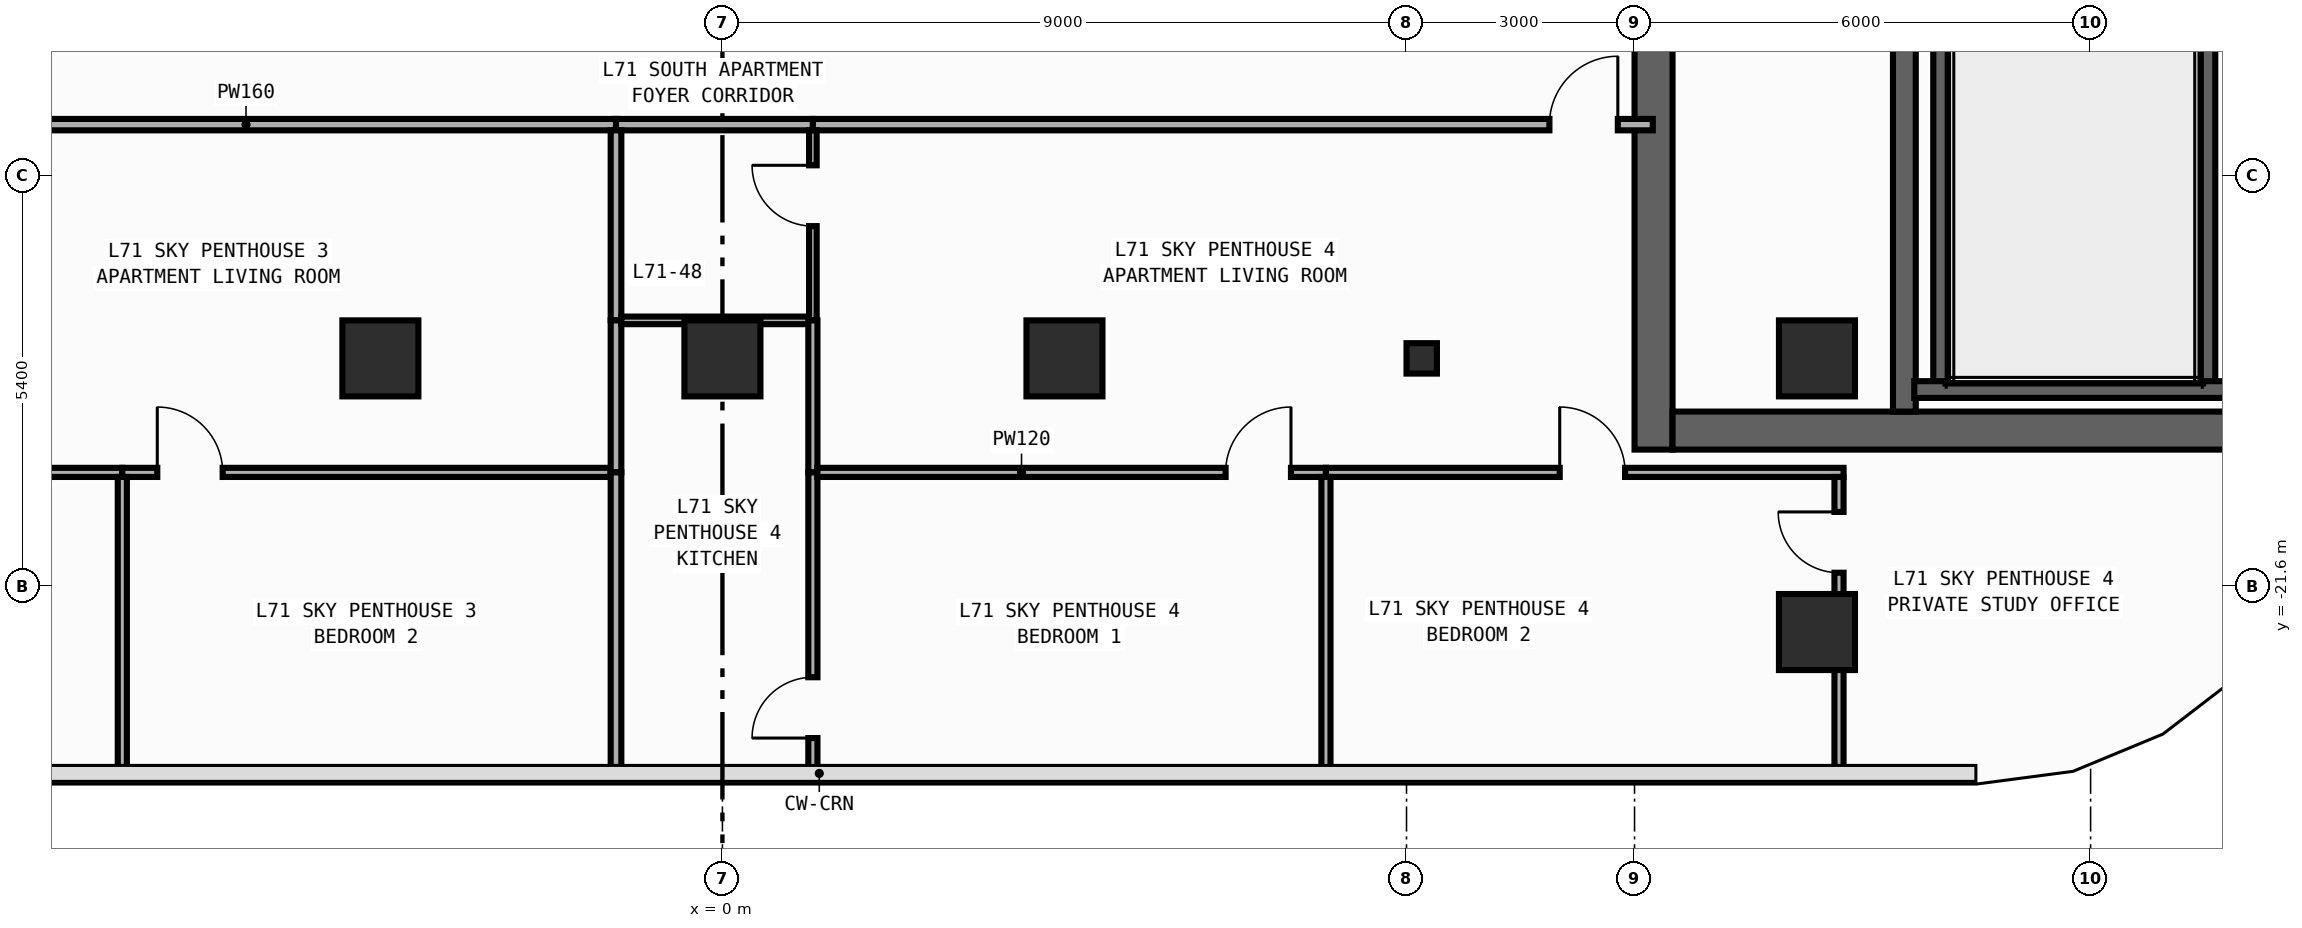
"""IFC4 building model, lengths in metres.
Left out: names, types, materials, properties, quantities, classifications, styles, units other than length and angle.
Written with IfcOpenShell. Run it as: python <this file> out.ifc"""

import sys

from ifc_helpers import new_model, si_unit, direction, frame, frame_2d, origin, origin_2d, place, context, subcontext, project, spatial, rectangle, circle, i_section, extrude, element, fill, save


model = new_model("IFC4")
c1 = context("Model", 3, precision=1e-05, world=origin(), true_north=direction((0.0, 1.0)))
c2 = subcontext(c1, "Body", "Model", "MODEL_VIEW")
j1 = project(units=[si_unit("LENGTHUNIT", "METRE"), si_unit("PLANEANGLEUNIT", "RADIAN")], contexts=[c1])
p1 = place(None, origin())
s1 = spatial("IfcSite", under=j1, at=p1, CompositionType="ELEMENT")
p2 = place(p1, origin())
s2 = spatial("IfcBuilding", under=s1, at=p2, CompositionType="ELEMENT")
p3 = place(p2, frame((0.0, 0.0, 296.6)))
s3 = spatial("IfcBuildingStorey", under=s2, at=p3, CompositionType="ELEMENT", Elevation=296.6)
p4 = place(p3, frame((12.25, -19.8, 0.0), z_axis=(0.0, 0.0, 1.0), x_axis=(0.0, 1.0, 0.0)))
e1 = element("IfcWall", 1, at=p4, inside=s3, PredefinedType="SHEAR", context=c2, shape_type="SweptSolid", body=[
    extrude(rectangle(XDim=27.0, YDim=0.5, at=frame_2d((13.5, 0.0))), origin(), (0.0, 0.0, 1.0), 3.54),
])
p5 = place(p4, frame((23.05, 0.0, 0.0)))
e2 = element("IfcOpeningElement", 2, at=p5, cuts=e1, PredefinedType="OPENING", context=c2, shape_type="SweptSolid", body=[
    extrude(rectangle(XDim=1.1, YDim=2.2, at=frame_2d((0.55, 1.1))), frame((0.0, 0.26, 0.0), z_axis=(0.0, -1.0, 0.0), x_axis=(1.0, 0.0, 0.0)), (0.0, 0.0, 1.0), 0.52),
])
p6 = place(p4, frame((19.85, 0.0, 0.0)))
e3 = element("IfcOpeningElement", 3, at=p6, cuts=e1, PredefinedType="OPENING", context=c2, shape_type="SweptSolid", body=[
    extrude(rectangle(XDim=1.1, YDim=2.2, at=frame_2d((0.55, 1.1))), frame((0.0, 0.26, 0.0), z_axis=(0.0, -1.0, 0.0), x_axis=(1.0, 0.0, 0.0)), (0.0, 0.0, 1.0), 0.52),
])
p7 = place(p4, frame((16.65, 0.0, 0.0)))
e4 = element("IfcOpeningElement", 4, at=p7, cuts=e1, PredefinedType="OPENING", context=c2, shape_type="SweptSolid", body=[
    extrude(rectangle(XDim=1.1, YDim=2.2, at=frame_2d((0.55, 1.1))), frame((0.0, 0.26, 0.0), z_axis=(0.0, -1.0, 0.0), x_axis=(1.0, 0.0, 0.0)), (0.0, 0.0, 1.0), 0.52),
])
p8 = place(p4, frame((10.175, 0.0, 0.0)))
e5 = element("IfcOpeningElement", 5, at=p8, cuts=e1, PredefinedType="OPENING", context=c2, shape_type="SweptSolid", body=[
    extrude(rectangle(XDim=0.85, YDim=2.1, at=frame_2d((0.425, 1.05))), frame((0.0, 0.26, 0.0), z_axis=(0.0, -1.0, 0.0), x_axis=(1.0, 0.0, 0.0)), (0.0, 0.0, 1.0), 0.52),
])
p9 = place(p4, frame((12.725, 0.0, 0.0)))
e6 = element("IfcOpeningElement", 6, at=p9, cuts=e1, PredefinedType="OPENING", context=c2, shape_type="SweptSolid", body=[
    extrude(rectangle(XDim=1.15, YDim=2.2, at=frame_2d((0.575, 1.1))), frame((0.0, 0.26, 0.0), z_axis=(0.0, -1.0, 0.0), x_axis=(1.0, 0.0, 0.0)), (0.0, 0.0, 1.0), 0.52),
])
p10 = place(p4, frame((25.125, 0.0, 0.0)))
e7 = element("IfcOpeningElement", 7, at=p10, cuts=e1, PredefinedType="OPENING", context=c2, shape_type="SweptSolid", body=[
    extrude(rectangle(XDim=0.85, YDim=2.1, at=frame_2d((0.425, 1.05))), frame((0.0, 0.26, 0.0), z_axis=(0.0, -1.0, 0.0), x_axis=(1.0, 0.0, 0.0)), (0.0, 0.0, 1.0), 0.52),
])
p11 = place(p3, frame((12.5, -19.55, 0.0), z_axis=(0.0, 0.0, 1.0), x_axis=(1.0, 0.0, 0.0)))
e8 = element("IfcWall", 8, at=p11, inside=s3, PredefinedType="SHEAR", context=c2, shape_type="SweptSolid", body=[
    extrude(rectangle(XDim=7.4, YDim=0.5, at=frame_2d((3.7, 0.0))), origin(), (0.0, 0.0, 1.0), 3.54),
])
p12 = place(p3, frame((15.55, -19.3, 0.0), z_axis=(0.0, 0.0, 1.0), x_axis=(0.0, 1.0, 0.0)))
e9 = element("IfcWall", 9, at=p12, inside=s3, PredefinedType="SHEAR", context=c2, shape_type="SweptSolid", body=[
    extrude(rectangle(XDim=26.0, YDim=0.3, at=frame_2d((13.0, 0.0))), origin(), (0.0, 0.0, 1.0), 3.54),
])
p13 = place(p12, frame((12.225, 0.0, 0.0)))
e10 = element("IfcOpeningElement", 10, at=p13, cuts=e9, PredefinedType="OPENING", context=c2, shape_type="SweptSolid", body=[
    extrude(rectangle(XDim=1.15, YDim=2.2, at=frame_2d((0.575, 1.1))), frame((0.0, 0.16, 0.0), z_axis=(0.0, -1.0, 0.0), x_axis=(1.0, 0.0, 0.0)), (0.0, 0.0, 1.0), 0.32),
])
p14 = place(p12, frame((24.625, 0.0, 0.0)))
e11 = element("IfcOpeningElement", 11, at=p14, cuts=e9, PredefinedType="OPENING", context=c2, shape_type="SweptSolid", body=[
    extrude(rectangle(XDim=0.85, YDim=2.1, at=frame_2d((0.425, 1.05))), frame((0.0, 0.16, 0.0), z_axis=(0.0, -1.0, 0.0), x_axis=(1.0, 0.0, 0.0)), (0.0, 0.0, 1.0), 0.32),
])
for number, where, z_axis, x_axis in (
    (12, (16.04, -19.01, 0.0), (0.0, 0.0, 1.0), (0.0, 1.0, 0.0)),
    (13, (19.53, -19.01, 0.0), (0.0, 0.0, 1.0), (0.0, 1.0, 0.0)),
):
    element("IfcWall", number, at=place(p3, frame(where, z_axis=z_axis, x_axis=x_axis)), inside=s3, PredefinedType="SHEAR", context=c2, shape_type="SweptSolid", body=[
        extrude(rectangle(XDim=11.42, YDim=0.22, at=frame_2d((5.71, 0.0))), origin(), (0.0, 0.0, 1.0), 3.54),
    ])
p15 = place(p3, frame((15.68, -19.01, 0.0), z_axis=(0.0, 0.0, 1.0), x_axis=(1.0, 0.0, 0.0)))
e14 = element("IfcWall", 14, at=p15, inside=s3, PredefinedType="SHEAR", context=c2, shape_type="SweptSolid", body=[
    extrude(rectangle(XDim=4.24, YDim=0.22, at=frame_2d((2.12, 0.0))), origin(), (0.0, 0.0, 1.0), 3.54),
])
p16 = place(p3, frame((9.2, -18.6, 0.0), z_axis=(0.0, 0.0, 1.0), x_axis=(1.0, 0.0, 0.0)))
e15 = element("IfcColumn", 15, at=p16, inside=s3, PredefinedType="COLUMN", context=c2, shape_type="SweptSolid", body=[
    extrude(i_section(OverallWidth=0.4, OverallDepth=0.4, WebThickness=0.013, FlangeThickness=0.021, FilletRadius=0.022, at=origin_2d()), origin(), (0.0, 0.0, 1.0), 3.8),
])
for number, where, z_axis, x_axis in (
    (16, (14.4, -18.6, 0.0), (0.0, 0.0, 1.0), (1.0, 0.0, 0.0)),
    (17, (-4.5, -18.6, 0.0), (0.0, 0.0, 1.0), (1.0, 0.0, 0.0)),
    (18, (0.0, -18.6, 0.0), (0.0, 0.0, 1.0), (1.0, 0.0, 0.0)),
    (19, (4.5, -18.6, 0.0), (0.0, 0.0, 1.0), (1.0, 0.0, 0.0)),
    (20, (14.4, -22.2, 0.0), (0.0, 0.0, 1.0), (1.0, 0.0, 0.0)),
):
    element("IfcColumn", number, at=place(p3, frame(where, z_axis=z_axis, x_axis=x_axis)), inside=s3, PredefinedType="COLUMN", context=c2, shape_type="SweptSolid", body=[
        extrude(circle(Radius=0.5, at=origin_2d()), origin(), (0.0, 0.0, 1.0), 3.8),
    ])
p17 = place(p3, frame((-14.31, -15.525, 0.0), z_axis=(0.0, 0.0, 1.0), x_axis=(1.0, 0.0, 0.0)))
e21 = element("IfcWall", 21, at=p17, inside=s3, PredefinedType="PARTITIONING", context=c2, shape_type="SweptSolid", body=[
    extrude(rectangle(XDim=12.91, YDim=0.15, at=frame_2d((6.455, 0.0))), origin(), (0.0, 0.0, 1.0), 3.54),
])
p18 = place(p17, frame((2.275, 0.0, 0.0)))
e22 = element("IfcOpeningElement", 22, at=p18, cuts=e21, PredefinedType="OPENING", context=c2, shape_type="SweptSolid", body=[
    extrude(rectangle(XDim=0.9, YDim=2.15, at=frame_2d((0.45, 1.075))), frame((0.0, 0.085, 0.0), z_axis=(0.0, -1.0, 0.0), x_axis=(1.0, 0.0, 0.0)), (0.0, 0.0, 1.0), 0.17),
])
p19 = place(p3, frame((-1.4, -15.525, 0.0), z_axis=(0.0, 0.0, 1.0), x_axis=(1.0, 0.0, 0.0)))
e23 = element("IfcWall", 23, at=p19, inside=s3, PredefinedType="PARTITIONING", context=c2, shape_type="SweptSolid", body=[
    extrude(rectangle(XDim=2.59, YDim=0.15, at=frame_2d((1.295, 0.0))), origin(), (0.0, 0.0, 1.0), 3.54),
])
p20 = place(p3, frame((1.19, -15.525, 0.0), z_axis=(0.0, 0.0, 1.0), x_axis=(1.0, 0.0, 0.0)))
e24 = element("IfcWall", 24, at=p20, inside=s3, PredefinedType="PARTITIONING", context=c2, shape_type="SweptSolid", body=[
    extrude(rectangle(XDim=11.05, YDim=0.15, at=frame_2d((5.525, 0.0))), origin(), (0.0, 0.0, 1.0), 3.54),
])
p21 = place(p20, frame((9.69, 0.0, 0.0)))
e25 = element("IfcOpeningElement", 25, at=p21, cuts=e24, PredefinedType="OPENING", context=c2, shape_type="SweptSolid", body=[
    extrude(rectangle(XDim=0.9, YDim=2.15, at=frame_2d((0.45, 1.075))), frame((0.0, 0.085, 0.0), z_axis=(0.0, -1.0, 0.0), x_axis=(1.0, 0.0, 0.0)), (0.0, 0.0, 1.0), 0.17),
])
p22 = place(p3, frame((-14.25, -20.1, 0.0), z_axis=(0.0, 0.0, 1.0), x_axis=(1.0, 0.0, 0.0)))
e26 = element("IfcWall", 26, at=p22, inside=s3, PredefinedType="PARTITIONING", context=c2, shape_type="SweptSolid", body=[
    extrude(rectangle(XDim=6.355, YDim=0.12, at=frame_2d((3.177, 0.0))), origin(), (0.0, 0.0, 1.0), 3.54),
])
p23 = place(p22, frame((2.124, 0.0, 0.0)))
e27 = element("IfcOpeningElement", 27, at=p23, cuts=e26, PredefinedType="OPENING", context=c2, shape_type="SweptSolid", body=[
    extrude(rectangle(XDim=0.86, YDim=2.15, at=frame_2d((0.43, 1.075))), frame((0.0, 0.07, 0.0), z_axis=(0.0, -1.0, 0.0), x_axis=(1.0, 0.0, 0.0)), (0.0, 0.0, 1.0), 0.14),
])
p24 = place(p3, frame((-7.895, -20.1, 0.0), z_axis=(0.0, 0.0, 1.0), x_axis=(1.0, 0.0, 0.0)))
e28 = element("IfcWall", 28, at=p24, inside=s3, PredefinedType="PARTITIONING", context=c2, shape_type="SweptSolid", body=[
    extrude(rectangle(XDim=6.425, YDim=0.12, at=frame_2d((3.212, 0.0))), origin(), (0.0, 0.0, 1.0), 3.54),
])
p25 = place(p24, frame((0.46, 0.0, 0.0)))
e29 = element("IfcOpeningElement", 29, at=p25, cuts=e28, PredefinedType="OPENING", context=c2, shape_type="SweptSolid", body=[
    extrude(rectangle(XDim=0.86, YDim=2.15, at=frame_2d((0.43, 1.075))), frame((0.0, 0.07, 0.0), z_axis=(0.0, -1.0, 0.0), x_axis=(1.0, 0.0, 0.0)), (0.0, 0.0, 1.0), 0.14),
])
p26 = place(p3, frame((-1.4, -18.1, 0.0), z_axis=(0.0, 0.0, 1.0), x_axis=(0.0, 1.0, 0.0)))
e30 = element("IfcWall", 30, at=p26, inside=s3, PredefinedType="PARTITIONING", context=c2, shape_type="SweptSolid", body=[
    extrude(rectangle(XDim=2.5, YDim=0.14, at=frame_2d((1.25, 0.0))), origin(), (0.0, 0.0, 1.0), 3.54),
])
p27 = place(p3, frame((-1.4, -20.1, 0.0), z_axis=(0.0, 0.0, 1.0), x_axis=(0.0, 1.0, 0.0)))
e31 = element("IfcWall", 31, at=p27, inside=s3, PredefinedType="PARTITIONING", context=c2, shape_type="SweptSolid", body=[
    extrude(rectangle(XDim=2.0, YDim=0.14, at=frame_2d((1.0, 0.0))), origin(), (0.0, 0.0, 1.0), 3.54),
])
p28 = place(p3, frame((-7.895, -24.055, 0.0), z_axis=(0.0, 0.0, 1.0), x_axis=(0.0, 1.0, 0.0)))
e32 = element("IfcWall", 32, at=p28, inside=s3, PredefinedType="PARTITIONING", context=c2, shape_type="SweptSolid", body=[
    extrude(rectangle(XDim=3.895, YDim=0.12, at=frame_2d((1.948, 0.0))), origin(), (0.0, 0.0, 1.0), 3.54),
])
p29 = place(p3, frame((-1.4, -24.055, 0.0), z_axis=(0.0, 0.0, 1.0), x_axis=(0.0, 1.0, 0.0)))
e33 = element("IfcWall", 33, at=p29, inside=s3, PredefinedType="PARTITIONING", context=c2, shape_type="SweptSolid", body=[
    extrude(rectangle(XDim=3.955, YDim=0.14, at=frame_2d((1.978, 0.0))), origin(), (0.0, 0.0, 1.0), 3.54),
])
p30 = place(p3, frame((-1.33, -18.1, 0.0), z_axis=(0.0, 0.0, 1.0), x_axis=(1.0, 0.0, 0.0)))
e34 = element("IfcWall", 34, at=p30, inside=s3, PredefinedType="PARTITIONING", context=c2, shape_type="SweptSolid", body=[
    extrude(rectangle(XDim=2.47, YDim=0.1, at=frame_2d((1.235, 0.0))), origin(), (0.0, 0.0, 1.0), 3.54),
])
p31 = place(p3, frame((1.19, -18.1, 0.0), z_axis=(0.0, 0.0, 1.0), x_axis=(0.0, 1.0, 0.0)))
e35 = element("IfcWall", 35, at=p31, inside=s3, PredefinedType="PARTITIONING", context=c2, shape_type="SweptSolid", body=[
    extrude(rectangle(XDim=2.5, YDim=0.1, at=frame_2d((1.25, 0.0))), origin(), (0.0, 0.0, 1.0), 3.54),
])
p32 = place(p31, frame((1.24, 0.0, 0.0)))
e36 = element("IfcOpeningElement", 36, at=p32, cuts=e35, PredefinedType="OPENING", context=c2, shape_type="SweptSolid", body=[
    extrude(rectangle(XDim=0.8, YDim=2.1, at=frame_2d((0.4, 1.05))), frame((0.0, 0.06, 0.0), z_axis=(0.0, -1.0, 0.0), x_axis=(1.0, 0.0, 0.0)), (0.0, 0.0, 1.0), 0.12),
])
p33 = place(p3, frame((1.19, -20.1, 0.0), z_axis=(0.0, 0.0, 1.0), x_axis=(0.0, 1.0, 0.0)))
e37 = element("IfcWall", 37, at=p33, inside=s3, PredefinedType="PARTITIONING", context=c2, shape_type="SweptSolid", body=[
    extrude(rectangle(XDim=2.0, YDim=0.12, at=frame_2d((1.0, 0.0))), origin(), (0.0, 0.0, 1.0), 3.54),
])
p34 = place(p3, frame((1.19, -24.055, 0.0), z_axis=(0.0, 0.0, 1.0), x_axis=(0.0, 1.0, 0.0)))
e38 = element("IfcWall", 38, at=p34, inside=s3, PredefinedType="PARTITIONING", context=c2, shape_type="SweptSolid", body=[
    extrude(rectangle(XDim=3.955, YDim=0.12, at=frame_2d((1.978, 0.0))), origin(), (0.0, 0.0, 1.0), 3.54),
])
p35 = place(p34, frame((0.46, 0.0, 0.0)))
e39 = element("IfcOpeningElement", 39, at=p35, cuts=e38, PredefinedType="OPENING", context=c2, shape_type="SweptSolid", body=[
    extrude(rectangle(XDim=0.8, YDim=2.1, at=frame_2d((0.4, 1.05))), frame((0.0, 0.07, 0.0), z_axis=(0.0, -1.0, 0.0), x_axis=(1.0, 0.0, 0.0)), (0.0, 0.0, 1.0), 0.14),
])
p36 = place(p3, frame((1.25, -20.1, 0.0), z_axis=(0.0, 0.0, 1.0), x_axis=(1.0, 0.0, 0.0)))
e40 = element("IfcWall", 40, at=p36, inside=s3, PredefinedType="PARTITIONING", context=c2, shape_type="SweptSolid", body=[
    extrude(rectangle(XDim=6.69, YDim=0.12, at=frame_2d((3.345, 0.0))), origin(), (0.0, 0.0, 1.0), 3.54),
])
p37 = place(p36, frame((5.37, 0.0, 0.0)))
e41 = element("IfcOpeningElement", 41, at=p37, cuts=e40, PredefinedType="OPENING", context=c2, shape_type="SweptSolid", body=[
    extrude(rectangle(XDim=0.86, YDim=2.15, at=frame_2d((0.43, 1.075))), frame((0.0, 0.07, 0.0), z_axis=(0.0, -1.0, 0.0), x_axis=(1.0, 0.0, 0.0)), (0.0, 0.0, 1.0), 0.14),
])
p38 = place(p3, frame((7.94, -20.1, 0.0), z_axis=(0.0, 0.0, 1.0), x_axis=(1.0, 0.0, 0.0)))
e42 = element("IfcWall", 42, at=p38, inside=s3, PredefinedType="PARTITIONING", context=c2, shape_type="SweptSolid", body=[
    extrude(rectangle(XDim=6.81, YDim=0.12, at=frame_2d((3.405, 0.0))), origin(), (0.0, 0.0, 1.0), 3.54),
])
p39 = place(p38, frame((3.076, 0.0, 0.0)))
e43 = element("IfcOpeningElement", 43, at=p39, cuts=e42, PredefinedType="OPENING", context=c2, shape_type="SweptSolid", body=[
    extrude(rectangle(XDim=0.86, YDim=2.15, at=frame_2d((0.43, 1.075))), frame((0.0, 0.07, 0.0), z_axis=(0.0, -1.0, 0.0), x_axis=(1.0, 0.0, 0.0)), (0.0, 0.0, 1.0), 0.14),
])
p40 = place(p3, frame((14.69, -24.055, 0.0), z_axis=(0.0, 0.0, 1.0), x_axis=(0.0, 1.0, 0.0)))
e44 = element("IfcWall", 44, at=p40, inside=s3, PredefinedType="PARTITIONING", context=c2, shape_type="SweptSolid", body=[
    extrude(rectangle(XDim=3.895, YDim=0.12, at=frame_2d((1.948, 0.0))), origin(), (0.0, 0.0, 1.0), 2.64),
])
p41 = place(p40, frame((2.635, 0.0, 0.0)))
e45 = element("IfcOpeningElement", 45, at=p41, cuts=e44, PredefinedType="OPENING", context=c2, shape_type="SweptSolid", body=[
    extrude(rectangle(XDim=0.8, YDim=2.1, at=frame_2d((0.4, 1.05))), frame((0.0, 0.07, 0.0), z_axis=(0.0, -1.0, 0.0), x_axis=(1.0, 0.0, 0.0)), (0.0, 0.0, 1.0), 0.14),
])
p42 = place(p3, frame((7.94, -24.055, 0.0), z_axis=(0.0, 0.0, 1.0), x_axis=(0.0, 1.0, 0.0)))
e46 = element("IfcWall", 46, at=p42, inside=s3, PredefinedType="PARTITIONING", context=c2, shape_type="SweptSolid", body=[
    extrude(rectangle(XDim=3.895, YDim=0.12, at=frame_2d((1.948, 0.0))), origin(), (0.0, 0.0, 1.0), 3.54),
])
p43 = place(p21, origin())
e47 = element("IfcDoor", 47, at=p43, inside=s3, OperationType="SINGLE_SWING_RIGHT", PredefinedType="DOOR", context=c2, shape_type="SweptSolid", body=[
    extrude(rectangle(XDim=0.9, YDim=2.15, at=frame_2d((0.45, 1.075))), frame((0.0, 0.025, 0.0), z_axis=(0.0, -1.0, 0.0), x_axis=(1.0, 0.0, 0.0)), (0.0, 0.0, 1.0), 0.05),
])
fill(e25, e47)
p44 = place(p25, origin())
e48 = element("IfcDoor", 48, at=p44, inside=s3, OperationType="SINGLE_SWING_LEFT", PredefinedType="DOOR", context=c2, shape_type="SweptSolid", body=[
    extrude(rectangle(XDim=0.86, YDim=2.15, at=frame_2d((0.43, 1.075))), frame((0.0, 0.025, 0.0), z_axis=(0.0, -1.0, 0.0), x_axis=(1.0, 0.0, 0.0)), (0.0, 0.0, 1.0), 0.05),
])
fill(e29, e48)
p45 = place(p32, origin())
e49 = element("IfcDoor", 49, at=p45, inside=s3, OperationType="SINGLE_SWING_RIGHT", PredefinedType="DOOR", context=c2, shape_type="SweptSolid", body=[
    extrude(rectangle(XDim=0.8, YDim=2.1, at=frame_2d((0.4, 1.05))), frame((0.0, 0.025, 0.0), z_axis=(0.0, -1.0, 0.0), x_axis=(1.0, 0.0, 0.0)), (0.0, 0.0, 1.0), 0.05),
])
fill(e36, e49)
p46 = place(p37, origin())
e50 = element("IfcDoor", 50, at=p46, inside=s3, OperationType="SINGLE_SWING_RIGHT", PredefinedType="DOOR", context=c2, shape_type="SweptSolid", body=[
    extrude(rectangle(XDim=0.86, YDim=2.15, at=frame_2d((0.43, 1.075))), frame((0.0, 0.025, 0.0), z_axis=(0.0, -1.0, 0.0), x_axis=(1.0, 0.0, 0.0)), (0.0, 0.0, 1.0), 0.05),
])
fill(e41, e50)
p47 = place(p39, origin())
e51 = element("IfcDoor", 51, at=p47, inside=s3, OperationType="SINGLE_SWING_LEFT", PredefinedType="DOOR", context=c2, shape_type="SweptSolid", body=[
    extrude(rectangle(XDim=0.86, YDim=2.15, at=frame_2d((0.43, 1.075))), frame((0.0, 0.025, 0.0), z_axis=(0.0, -1.0, 0.0), x_axis=(1.0, 0.0, 0.0)), (0.0, 0.0, 1.0), 0.05),
])
fill(e43, e51)
p48 = place(p35, origin())
e52 = element("IfcDoor", 52, at=p48, inside=s3, OperationType="SINGLE_SWING_LEFT", PredefinedType="DOOR", context=c2, shape_type="SweptSolid", body=[
    extrude(rectangle(XDim=0.8, YDim=2.1, at=frame_2d((0.4, 1.05))), frame((0.0, 0.025, 0.0), z_axis=(0.0, -1.0, 0.0), x_axis=(1.0, 0.0, 0.0)), (0.0, 0.0, 1.0), 0.05),
])
fill(e39, e52)
p49 = place(p41, origin())
e53 = element("IfcDoor", 53, at=p49, inside=s3, OperationType="SINGLE_SWING_RIGHT", PredefinedType="DOOR", context=c2, shape_type="SweptSolid", body=[
    extrude(rectangle(XDim=0.8, YDim=2.1, at=frame_2d((0.4, 1.05))), frame((0.0, 0.025, 0.0), z_axis=(0.0, -1.0, 0.0), x_axis=(1.0, 0.0, 0.0)), (0.0, 0.0, 1.0), 0.05),
])
fill(e45, e53)
save(model, sys.argv[1])
